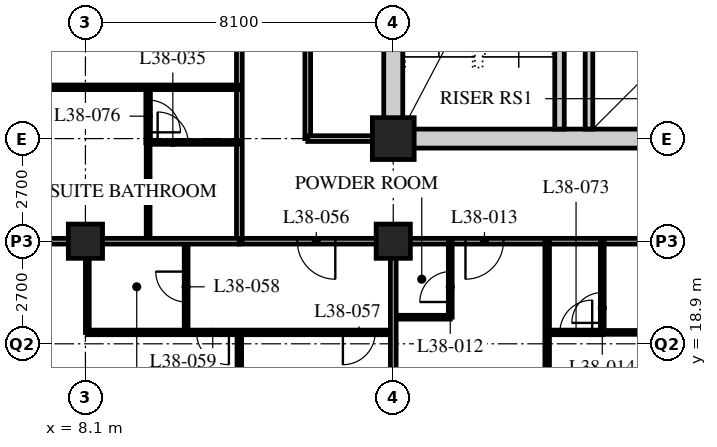
"""IFC4 building model, lengths in metres.
Left out: names, types, materials, properties, quantities, classifications, styles, units other than length and angle.
Written with IfcOpenShell. Run it as: python <this file> out.ifc"""

import sys

from ifc_helpers import new_model, si_unit, direction, frame, frame_2d, origin, origin_2d, place, context, subcontext, project, spatial, rectangle, hollow_rectangle, extrude, element, fill, save


model = new_model("IFC4")
c1 = context("Model", 3, precision=1e-05, world=origin(), true_north=direction((0.0, 1.0)))
c2 = subcontext(c1, "Body", "Model", "MODEL_VIEW")
j1 = project(units=[si_unit("LENGTHUNIT", "METRE"), si_unit("PLANEANGLEUNIT", "RADIAN")], contexts=[c1])
p1 = place(None, origin())
s1 = spatial("IfcSite", under=j1, at=p1, CompositionType="ELEMENT")
p2 = place(p1, origin())
s2 = spatial("IfcBuilding", under=s1, at=p2, CompositionType="ELEMENT")
p3 = place(p2, frame((0.0, 0.0, 147.6)))
s3 = spatial("IfcBuildingStorey", under=s2, at=p3, CompositionType="ELEMENT", Elevation=147.6)
for number, where, z_axis, x_axis in (
    (1, (8.1, 21.6, 0.0), (0.0, 0.0, 1.0), (1.0, 0.0, 0.0)),
    (2, (16.2, 21.6, 0.0), (0.0, 0.0, 1.0), (1.0, 0.0, 0.0)),
):
    element("IfcColumn", number, at=place(p3, frame(where, z_axis=z_axis, x_axis=x_axis)), inside=s3, PredefinedType="COLUMN", context=c2, shape_type="SweptSolid", body=[
        extrude(hollow_rectangle(XDim=0.9, YDim=0.9, WallThickness=0.1, at=origin_2d()), origin(), (0.0, 0.0, 1.0), 3.4),
    ])
p4 = place(p3, frame((16.2, 24.3, 0.0), z_axis=(0.0, 0.0, 1.0), x_axis=(1.0, 0.0, 0.0)))
e3 = element("IfcColumn", 3, at=p4, inside=s3, PredefinedType="COLUMN", context=c2, shape_type="SweptSolid", body=[
    extrude(hollow_rectangle(XDim=1.1, YDim=1.1, WallThickness=0.1, at=origin_2d()), origin(), (0.0, 0.0, 1.0), 3.4),
])
p5 = place(p3, frame((12.15, 21.6, 0.0), z_axis=(0.0, 0.0, 1.0), x_axis=(1.0, 0.0, 0.0)))
e4 = element("IfcWall", 4, at=p5, inside=s3, PredefinedType="PARTITIONING", context=c2, shape_type="SweptSolid", body=[
    extrude(rectangle(XDim=36.45, YDim=0.15, at=frame_2d((18.225, 0.0))), origin(), (0.0, 0.0, 1.0), 2.42),
])
p6 = place(p5, frame((5.95, 0.0, 0.0)))
e5 = element("IfcOpeningElement", 5, at=p6, cuts=e4, PredefinedType="OPENING", context=c2, shape_type="SweptSolid", body=[
    extrude(rectangle(XDim=1.0, YDim=2.1, at=frame_2d((0.5, 1.05))), frame((0.0, 0.085, 0.0), z_axis=(0.0, -1.0, 0.0), x_axis=(1.0, 0.0, 0.0)), (0.0, 0.0, 1.0), 0.17),
])
p7 = place(p5, frame((14.05, 0.0, 0.0)))
e6 = element("IfcOpeningElement", 6, at=p7, cuts=e4, PredefinedType="OPENING", context=c2, shape_type="SweptSolid", body=[
    extrude(rectangle(XDim=1.0, YDim=2.1, at=frame_2d((0.5, 1.05))), frame((0.0, 0.085, 0.0), z_axis=(0.0, -1.0, 0.0), x_axis=(1.0, 0.0, 0.0)), (0.0, 0.0, 1.0), 0.17),
])
p8 = place(p5, frame((22.15, 0.0, 0.0)))
e7 = element("IfcOpeningElement", 7, at=p8, cuts=e4, PredefinedType="OPENING", context=c2, shape_type="SweptSolid", body=[
    extrude(rectangle(XDim=1.0, YDim=2.1, at=frame_2d((0.5, 1.05))), frame((0.0, 0.085, 0.0), z_axis=(0.0, -1.0, 0.0), x_axis=(1.0, 0.0, 0.0)), (0.0, 0.0, 1.0), 0.17),
])
p9 = place(p5, frame((30.8, 0.0, 0.0)))
e8 = element("IfcOpeningElement", 8, at=p9, cuts=e4, PredefinedType="OPENING", context=c2, shape_type="SweptSolid", body=[
    extrude(rectangle(XDim=1.0, YDim=2.1, at=frame_2d((0.5, 1.05))), frame((0.0, 0.085, 0.0), z_axis=(0.0, -1.0, 0.0), x_axis=(1.0, 0.0, 0.0)), (0.0, 0.0, 1.0), 0.17),
])
p10 = place(p5, frame((1.525, 0.0, 0.0)))
e9 = element("IfcOpeningElement", 9, at=p10, cuts=e4, PredefinedType="OPENING", context=c2, shape_type="SweptSolid", body=[
    extrude(rectangle(XDim=1.0, YDim=2.1, at=frame_2d((0.5, 1.05))), frame((0.0, 0.085, 0.0), z_axis=(0.0, -1.0, 0.0), x_axis=(1.0, 0.0, 0.0)), (0.0, 0.0, 1.0), 0.17),
])
p11 = place(p5, frame((33.925, 0.0, 0.0)))
e10 = element("IfcOpeningElement", 10, at=p11, cuts=e4, PredefinedType="OPENING", context=c2, shape_type="SweptSolid", body=[
    extrude(rectangle(XDim=1.0, YDim=2.1, at=frame_2d((0.5, 1.05))), frame((0.0, 0.085, 0.0), z_axis=(0.0, -1.0, 0.0), x_axis=(1.0, 0.0, 0.0)), (0.0, 0.0, 1.0), 0.17),
])
p12 = place(p3, frame((12.15, 21.6, 0.0), z_axis=(0.0, 0.0, 1.0), x_axis=(0.0, 1.0, 0.0)))
e11 = element("IfcWall", 11, at=p12, inside=s3, PredefinedType="PARTITIONING", context=c2, shape_type="SweptSolid", body=[
    extrude(rectangle(XDim=24.3, YDim=0.15, at=frame_2d((12.15, 0.0))), origin(), (0.0, 0.0, 1.0), 3.19),
])
p13 = place(p12, frame((5.575, 0.0, 0.0)))
e12 = element("IfcOpeningElement", 12, at=p13, cuts=e11, PredefinedType="OPENING", context=c2, shape_type="SweptSolid", body=[
    extrude(rectangle(XDim=1.0, YDim=2.1, at=frame_2d((0.5, 1.05))), frame((0.0, 0.085, 0.0), z_axis=(0.0, -1.0, 0.0), x_axis=(1.0, 0.0, 0.0)), (0.0, 0.0, 1.0), 0.17),
])
p14 = place(p12, frame((14.05, 0.0, 0.0)))
e13 = element("IfcOpeningElement", 13, at=p14, cuts=e11, PredefinedType="OPENING", context=c2, shape_type="SweptSolid", body=[
    extrude(rectangle(XDim=1.0, YDim=2.1, at=frame_2d((0.5, 1.05))), frame((0.0, 0.085, 0.0), z_axis=(0.0, -1.0, 0.0), x_axis=(1.0, 0.0, 0.0)), (0.0, 0.0, 1.0), 0.17),
])
p15 = place(p12, frame((22.7, 0.0, 0.0)))
e14 = element("IfcOpeningElement", 14, at=p15, cuts=e11, PredefinedType="OPENING", context=c2, shape_type="SweptSolid", body=[
    extrude(rectangle(XDim=1.0, YDim=2.1, at=frame_2d((0.5, 1.05))), frame((0.0, 0.085, 0.0), z_axis=(0.0, -1.0, 0.0), x_axis=(1.0, 0.0, 0.0)), (0.0, 0.0, 1.0), 0.17),
])
p16 = place(p3, frame((13.95, 44.1, 0.0), z_axis=(0.0, 0.0, 1.0), x_axis=(0.0, -1.0, 0.0)))
e15 = element("IfcWall", 15, at=p16, inside=s3, PredefinedType="PARTITIONING", context=c2, shape_type="SweptSolid", body=[
    extrude(rectangle(XDim=19.8, YDim=0.15, at=frame_2d((9.9, 0.0))), origin(), (0.0, 0.0, 1.0), 3.19),
])
p17 = place(p16, frame((15.25, 0.0, 0.0)))
e16 = element("IfcOpeningElement", 16, at=p17, cuts=e15, PredefinedType="OPENING", context=c2, shape_type="SweptSolid", body=[
    extrude(rectangle(XDim=1.0, YDim=2.1, at=frame_2d((0.5, 1.05))), frame((0.0, 0.085, 0.0), z_axis=(0.0, -1.0, 0.0), x_axis=(1.0, 0.0, 0.0)), (0.0, 0.0, 1.0), 0.17),
])
p18 = place(p16, frame((7.15, 0.0, 0.0)))
e17 = element("IfcOpeningElement", 17, at=p18, cuts=e15, PredefinedType="OPENING", context=c2, shape_type="SweptSolid", body=[
    extrude(rectangle(XDim=1.0, YDim=2.1, at=frame_2d((0.5, 1.05))), frame((0.0, 0.085, 0.0), z_axis=(0.0, -1.0, 0.0), x_axis=(1.0, 0.0, 0.0)), (0.0, 0.0, 1.0), 0.17),
])
p19 = place(p3, frame((13.95, 24.3, 0.0), z_axis=(0.0, 0.0, 1.0), x_axis=(1.0, 0.0, 0.0)))
e18 = element("IfcWall", 18, at=p19, inside=s3, PredefinedType="PARTITIONING", context=c2, shape_type="SweptSolid", body=[
    extrude(rectangle(XDim=2.05, YDim=0.15, at=frame_2d((1.025, 0.0))), origin(), (0.0, 0.0, 1.0), 3.19),
])
p20 = place(p3, frame((16.2, 19.6, 0.0), z_axis=(0.0, 0.0, 1.0), x_axis=(1.0, 0.0, 0.0)))
e19 = element("IfcWall", 19, at=p20, inside=s3, PredefinedType="PARTITIONING", context=c2, shape_type="SweptSolid", body=[
    extrude(rectangle(XDim=1.5, YDim=0.1, at=frame_2d((0.75, 0.0))), origin(), (0.0, 0.0, 1.0), 3.19),
])
p21 = place(p3, frame((17.7, 21.6, 0.0), z_axis=(0.0, 0.0, 1.0), x_axis=(0.0, -1.0, 0.0)))
e20 = element("IfcWall", 20, at=p21, inside=s3, PredefinedType="PARTITIONING", context=c2, shape_type="SweptSolid", body=[
    extrude(rectangle(XDim=2.0, YDim=0.1, at=frame_2d((1.0, 0.0))), origin(), (0.0, 0.0, 1.0), 3.19),
])
p22 = place(p21, frame((0.8, 0.0, 0.0)))
e21 = element("IfcOpeningElement", 21, at=p22, cuts=e20, PredefinedType="OPENING", context=c2, shape_type="SweptSolid", body=[
    extrude(rectangle(XDim=0.8, YDim=2.1, at=frame_2d((0.4, 1.05))), frame((0.0, 0.06, 0.0), z_axis=(0.0, -1.0, 0.0), x_axis=(1.0, 0.0, 0.0)), (0.0, 0.0, 1.0), 0.12),
])
p23 = place(p3, frame((21.7, 19.2, 0.0), z_axis=(0.0, 0.0, 1.0), x_axis=(1.0, 0.0, 0.0)))
e22 = element("IfcWall", 22, at=p23, inside=s3, PredefinedType="PARTITIONING", context=c2, shape_type="SweptSolid", body=[
    extrude(rectangle(XDim=2.6, YDim=0.1, at=frame_2d((1.3, 0.0))), origin(), (0.0, 0.0, 1.0), 3.19),
])
p24 = place(p3, frame((21.7, 21.6, 0.0), z_axis=(0.0, 0.0, 1.0), x_axis=(0.0, -1.0, 0.0)))
e23 = element("IfcWall", 23, at=p24, inside=s3, PredefinedType="PARTITIONING", context=c2, shape_type="SweptSolid", body=[
    extrude(rectangle(XDim=2.4, YDim=0.1, at=frame_2d((1.2, 0.0))), origin(), (0.0, 0.0, 1.0), 3.19),
])
p25 = place(p24, frame((1.35, 0.0, 0.0)))
e24 = element("IfcOpeningElement", 24, at=p25, cuts=e23, PredefinedType="OPENING", context=c2, shape_type="SweptSolid", body=[
    extrude(rectangle(XDim=0.8, YDim=2.1, at=frame_2d((0.4, 1.05))), frame((0.0, 0.06, 0.0), z_axis=(0.0, -1.0, 0.0), x_axis=(1.0, 0.0, 0.0)), (0.0, 0.0, 1.0), 0.12),
])
p26 = place(p3, frame((20.25, 21.6, 0.0), z_axis=(0.0, 0.0, 1.0), x_axis=(0.0, -1.0, 0.0)))
e25 = element("IfcWall", 25, at=p26, inside=s3, PredefinedType="PARTITIONING", context=c2, shape_type="SweptSolid", body=[
    extrude(rectangle(XDim=15.9, YDim=0.12, at=frame_2d((7.95, 0.0))), origin(), (0.0, 0.0, 1.0), 3.19),
])
p27 = place(p26, frame((8.875, 0.0, 0.0)))
e26 = element("IfcOpeningElement", 26, at=p27, cuts=e25, PredefinedType="OPENING", context=c2, shape_type="SweptSolid", body=[
    extrude(rectangle(XDim=0.85, YDim=2.1, at=frame_2d((0.425, 1.05))), frame((0.0, 0.07, 0.0), z_axis=(0.0, -1.0, 0.0), x_axis=(1.0, 0.0, 0.0)), (0.0, 0.0, 1.0), 0.14),
])
p28 = place(p3, frame((9.75, 21.6, 0.0), z_axis=(0.0, 0.0, 1.0), x_axis=(0.0, 1.0, 0.0)))
e27 = element("IfcWall", 27, at=p28, inside=s3, PredefinedType="PARTITIONING", context=c2, shape_type="SweptSolid", body=[
    extrude(rectangle(XDim=2.6, YDim=0.1, at=frame_2d((1.3, 0.0))), origin(), (0.0, 0.0, 1.0), 3.19),
])
p29 = place(p3, frame((12.15, 24.2, 0.0), z_axis=(0.0, 0.0, 1.0), x_axis=(-1.0, 0.0, 0.0)))
e28 = element("IfcWall", 28, at=p29, inside=s3, PredefinedType="PARTITIONING", context=c2, shape_type="SweptSolid", body=[
    extrude(rectangle(XDim=2.4, YDim=0.1, at=frame_2d((1.2, 0.0))), origin(), (0.0, 0.0, 1.0), 3.19),
])
p30 = place(p29, frame((1.35, 0.0, 0.0)))
e29 = element("IfcOpeningElement", 29, at=p30, cuts=e28, PredefinedType="OPENING", context=c2, shape_type="SweptSolid", body=[
    extrude(rectangle(XDim=0.8, YDim=2.1, at=frame_2d((0.4, 1.05))), frame((0.0, 0.06, 0.0), z_axis=(0.0, -1.0, 0.0), x_axis=(1.0, 0.0, 0.0)), (0.0, 0.0, 1.0), 0.12),
])
p31 = place(p3, frame((12.15, 25.65, 0.0), z_axis=(0.0, 0.0, 1.0), x_axis=(-1.0, 0.0, 0.0)))
e30 = element("IfcWall", 30, at=p31, inside=s3, PredefinedType="PARTITIONING", context=c2, shape_type="SweptSolid", body=[
    extrude(rectangle(XDim=11.85, YDim=0.12, at=frame_2d((5.925, 0.0))), origin(), (0.0, 0.0, 1.0), 3.19),
])
p32 = place(p31, frame((6.85, 0.0, 0.0)))
e31 = element("IfcOpeningElement", 31, at=p32, cuts=e30, PredefinedType="OPENING", context=c2, shape_type="SweptSolid", body=[
    extrude(rectangle(XDim=0.85, YDim=2.1, at=frame_2d((0.425, 1.05))), frame((0.0, 0.07, 0.0), z_axis=(0.0, -1.0, 0.0), x_axis=(1.0, 0.0, 0.0)), (0.0, 0.0, 1.0), 0.14),
])
p33 = place(p3, frame((10.75, 21.6, 0.0), z_axis=(0.0, 0.0, 1.0), x_axis=(0.0, -1.0, 0.0)))
e32 = element("IfcWall", 32, at=p33, inside=s3, PredefinedType="PARTITIONING", context=c2, shape_type="SweptSolid", body=[
    extrude(rectangle(XDim=2.4, YDim=0.1, at=frame_2d((1.2, 0.0))), origin(), (0.0, 0.0, 1.0), 3.19),
])
p34 = place(p33, frame((0.8, 0.0, 0.0)))
e33 = element("IfcOpeningElement", 33, at=p34, cuts=e32, PredefinedType="OPENING", context=c2, shape_type="SweptSolid", body=[
    extrude(rectangle(XDim=0.8, YDim=2.1, at=frame_2d((0.4, 1.05))), frame((0.0, 0.06, 0.0), z_axis=(0.0, -1.0, 0.0), x_axis=(1.0, 0.0, 0.0)), (0.0, 0.0, 1.0), 0.12),
])
p35 = place(p3, frame((8.15, 21.6, 0.0), z_axis=(0.0, 0.0, 1.0), x_axis=(0.0, -1.0, 0.0)))
e34 = element("IfcWall", 34, at=p35, inside=s3, PredefinedType="PARTITIONING", context=c2, shape_type="SweptSolid", body=[
    extrude(rectangle(XDim=2.4, YDim=0.1, at=frame_2d((1.2, 0.0))), origin(), (0.0, 0.0, 1.0), 2.42),
])
p36 = place(p3, frame((8.15, 19.2, 0.0), z_axis=(0.0, 0.0, 1.0), x_axis=(1.0, 0.0, 0.0)))
e35 = element("IfcWall", 35, at=p36, inside=s3, PredefinedType="PARTITIONING", context=c2, shape_type="SweptSolid", body=[
    extrude(rectangle(XDim=8.05, YDim=0.12, at=frame_2d((4.025, 0.0))), origin(), (0.0, 0.0, 1.0), 3.19),
])
p37 = place(p36, frame((6.725, 0.0, 0.0)))
e36 = element("IfcOpeningElement", 36, at=p37, cuts=e35, PredefinedType="OPENING", context=c2, shape_type="SweptSolid", body=[
    extrude(rectangle(XDim=0.85, YDim=2.1, at=frame_2d((0.425, 1.05))), frame((0.0, 0.07, 0.0), z_axis=(0.0, -1.0, 0.0), x_axis=(1.0, 0.0, 0.0)), (0.0, 0.0, 1.0), 0.14),
])
p38 = place(p36, frame((2.875, 0.0, 0.0)))
e37 = element("IfcOpeningElement", 37, at=p38, cuts=e35, PredefinedType="OPENING", context=c2, shape_type="SweptSolid", body=[
    extrude(rectangle(XDim=0.85, YDim=2.1, at=frame_2d((0.425, 1.05))), frame((0.0, 0.07, 0.0), z_axis=(0.0, -1.0, 0.0), x_axis=(1.0, 0.0, 0.0)), (0.0, 0.0, 1.0), 0.14),
])
p39 = place(p3, frame((12.15, 19.2, 0.0), z_axis=(0.0, 0.0, 1.0), x_axis=(0.0, -1.0, 0.0)))
e38 = element("IfcWall", 38, at=p39, inside=s3, PredefinedType="PARTITIONING", context=c2, shape_type="SweptSolid", body=[
    extrude(rectangle(XDim=13.5, YDim=0.12, at=frame_2d((6.75, 0.0))), origin(), (0.0, 0.0, 1.0), 3.19),
])
p40 = place(p3, frame((0.3, 21.6, 0.0), z_axis=(0.0, 0.0, 1.0), x_axis=(1.0, 0.0, 0.0)))
e39 = element("IfcWall", 39, at=p40, inside=s3, PredefinedType="PARTITIONING", context=c2, shape_type="SweptSolid", body=[
    extrude(rectangle(XDim=11.85, YDim=0.15, at=frame_2d((5.925, 0.0))), origin(), (0.0, 0.0, 1.0), 2.42),
])
p41 = place(p3, frame((16.2, 21.6, 0.0), z_axis=(0.0, 0.0, 1.0), x_axis=(0.0, -1.0, 0.0)))
e40 = element("IfcWall", 40, at=p41, inside=s3, PredefinedType="PARTITIONING", context=c2, shape_type="SweptSolid", body=[
    extrude(rectangle(XDim=15.9, YDim=0.15, at=frame_2d((7.95, 0.0))), origin(), (0.0, 0.0, 1.0), 2.42),
])
p42 = place(p3, frame((21.71, 19.2, 0.0), z_axis=(0.0, 0.0, 1.0), x_axis=(-1.0, 0.0, 0.0)))
e41 = element("IfcWall", 41, at=p42, inside=s3, PredefinedType="PARTITIONING", context=c2, shape_type="SweptSolid", body=[
    extrude(rectangle(XDim=1.46, YDim=0.12, at=frame_2d((0.73, 0.0))), origin(), (0.0, 0.0, 1.0), 3.19),
])
p43 = place(p42, frame((0.275, 0.0, 0.0)))
e42 = element("IfcOpeningElement", 42, at=p43, cuts=e41, PredefinedType="OPENING", context=c2, shape_type="SweptSolid", body=[
    extrude(rectangle(XDim=0.85, YDim=2.1, at=frame_2d((0.425, 1.05))), frame((0.0, 0.07, 0.0), z_axis=(0.0, -1.0, 0.0), x_axis=(1.0, 0.0, 0.0)), (0.0, 0.0, 1.0), 0.14),
])
p44 = place(p3, frame((9.75, 24.19, 0.0), z_axis=(0.0, 0.0, 1.0), x_axis=(0.0, 1.0, 0.0)))
e43 = element("IfcWall", 43, at=p44, inside=s3, PredefinedType="PARTITIONING", context=c2, shape_type="SweptSolid", body=[
    extrude(rectangle(XDim=1.46, YDim=0.12, at=frame_2d((0.73, 0.0))), origin(), (0.0, 0.0, 1.0), 3.19),
])
p45 = place(p44, frame((0.275, 0.0, 0.0)))
e44 = element("IfcOpeningElement", 44, at=p45, cuts=e43, PredefinedType="OPENING", context=c2, shape_type="SweptSolid", body=[
    extrude(rectangle(XDim=0.85, YDim=2.1, at=frame_2d((0.425, 1.05))), frame((0.0, 0.07, 0.0), z_axis=(0.0, -1.0, 0.0), x_axis=(1.0, 0.0, 0.0)), (0.0, 0.0, 1.0), 0.14),
])
p46 = place(p3, frame((15.95, 24.3, 0.0), z_axis=(0.0, 0.0, 1.0), x_axis=(1.0, 0.0, 0.0)))
e45 = element("IfcWall", 45, at=p46, inside=s3, PredefinedType="SOLIDWALL", context=c2, shape_type="SweptSolid", body=[
    extrude(rectangle(XDim=24.8, YDim=0.5, at=frame_2d((12.4, 0.0))), origin(), (0.0, 0.0, 1.0), 2.42),
])
p47 = place(p46, frame((11.5, 0.0, 0.0)))
e46 = element("IfcOpeningElement", 46, at=p47, cuts=e45, PredefinedType="OPENING", context=c2, shape_type="SweptSolid", body=[
    extrude(rectangle(XDim=1.8, YDim=2.4, at=frame_2d((0.9, 1.2))), frame((0.0, 0.26, 0.0), z_axis=(0.0, -1.0, 0.0), x_axis=(1.0, 0.0, 0.0)), (0.0, 0.0, 1.0), 0.52),
])
p48 = place(p3, frame((16.2, 24.55, 0.0), z_axis=(0.0, 0.0, 1.0), x_axis=(0.0, 1.0, 0.0)))
e47 = element("IfcWall", 47, at=p48, inside=s3, PredefinedType="SOLIDWALL", context=c2, shape_type="SweptSolid", body=[
    extrude(rectangle(XDim=15.7, YDim=0.5, at=frame_2d((7.85, 0.0))), origin(), (0.0, 0.0, 1.0), 2.42),
])
p49 = place(p3, frame((20.575, 24.55, 0.0), z_axis=(0.0, 0.0, 1.0), x_axis=(0.0, 1.0, 0.0)))
e48 = element("IfcWall", 48, at=p49, inside=s3, PredefinedType="SOLIDWALL", context=c2, shape_type="SweptSolid", body=[
    extrude(rectangle(XDim=7.75, YDim=0.25, at=frame_2d((3.875, 0.0))), origin(), (0.0, 0.0, 1.0), 3.19),
])
p50 = place(p49, frame((6.2, 0.0, 0.0)))
e49 = element("IfcOpeningElement", 49, at=p50, cuts=e48, PredefinedType="OPENING", context=c2, shape_type="SweptSolid", body=[
    extrude(rectangle(XDim=1.2, YDim=2.1, at=frame_2d((0.6, 1.05))), frame((0.0, 0.135, 0.0), z_axis=(0.0, -1.0, 0.0), x_axis=(1.0, 0.0, 0.0)), (0.0, 0.0, 1.0), 0.27),
])
p51 = place(p3, frame((21.35, 24.55, 0.0), z_axis=(0.0, 0.0, 1.0), x_axis=(0.0, 1.0, 0.0)))
e50 = element("IfcWall", 50, at=p51, inside=s3, PredefinedType="SOLIDWALL", context=c2, shape_type="SweptSolid", body=[
    extrude(rectangle(XDim=2.6, YDim=0.2, at=frame_2d((1.3, 0.0))), origin(), (0.0, 0.0, 1.0), 3.19),
])
p52 = place(p22, origin())
e51 = element("IfcDoor", 51, at=p52, inside=s3, OperationType="SINGLE_SWING_LEFT", PredefinedType="DOOR", context=c2, shape_type="SweptSolid", body=[
    extrude(rectangle(XDim=0.8, YDim=2.1, at=frame_2d((0.4, 1.05))), frame((0.0, 0.025, 0.0), z_axis=(0.0, -1.0, 0.0), x_axis=(1.0, 0.0, 0.0)), (0.0, 0.0, 1.0), 0.05),
])
fill(e21, e51)
p53 = place(p6, origin())
e52 = element("IfcDoor", 52, at=p53, inside=s3, OperationType="SINGLE_SWING_RIGHT", PredefinedType="DOOR", context=c2, shape_type="SweptSolid", body=[
    extrude(rectangle(XDim=1.0, YDim=2.1, at=frame_2d((0.5, 1.05))), frame((0.0, 0.025, 0.0), z_axis=(0.0, -1.0, 0.0), x_axis=(1.0, 0.0, 0.0)), (0.0, 0.0, 1.0), 0.05),
])
fill(e5, e52)
p54 = place(p25, origin())
e53 = element("IfcDoor", 53, at=p54, inside=s3, OperationType="SINGLE_SWING_LEFT", PredefinedType="DOOR", context=c2, shape_type="SweptSolid", body=[
    extrude(rectangle(XDim=0.8, YDim=2.1, at=frame_2d((0.4, 1.05))), frame((0.0, 0.025, 0.0), z_axis=(0.0, -1.0, 0.0), x_axis=(1.0, 0.0, 0.0)), (0.0, 0.0, 1.0), 0.05),
])
fill(e24, e53)
p55 = place(p30, origin())
e54 = element("IfcDoor", 54, at=p55, inside=s3, OperationType="SINGLE_SWING_LEFT", PredefinedType="DOOR", context=c2, shape_type="SweptSolid", body=[
    extrude(rectangle(XDim=0.8, YDim=2.1, at=frame_2d((0.4, 1.05))), frame((0.0, 0.025, 0.0), z_axis=(0.0, -1.0, 0.0), x_axis=(1.0, 0.0, 0.0)), (0.0, 0.0, 1.0), 0.05),
])
fill(e29, e54)
p56 = place(p10, origin())
e55 = element("IfcDoor", 55, at=p56, inside=s3, OperationType="SINGLE_SWING_LEFT", PredefinedType="DOOR", context=c2, shape_type="SweptSolid", body=[
    extrude(rectangle(XDim=1.0, YDim=2.1, at=frame_2d((0.5, 1.05))), frame((0.0, 0.025, 0.0), z_axis=(0.0, -1.0, 0.0), x_axis=(1.0, 0.0, 0.0)), (0.0, 0.0, 1.0), 0.05),
])
fill(e9, e55)
p57 = place(p37, origin())
e56 = element("IfcDoor", 56, at=p57, inside=s3, OperationType="SINGLE_SWING_RIGHT", PredefinedType="DOOR", context=c2, shape_type="SweptSolid", body=[
    extrude(rectangle(XDim=0.85, YDim=2.1, at=frame_2d((0.425, 1.05))), frame((0.0, 0.025, 0.0), z_axis=(0.0, -1.0, 0.0), x_axis=(1.0, 0.0, 0.0)), (0.0, 0.0, 1.0), 0.05),
])
fill(e36, e56)
p58 = place(p34, origin())
e57 = element("IfcDoor", 57, at=p58, inside=s3, OperationType="SINGLE_SWING_RIGHT", PredefinedType="DOOR", context=c2, shape_type="SweptSolid", body=[
    extrude(rectangle(XDim=0.8, YDim=2.1, at=frame_2d((0.4, 1.05))), frame((0.0, 0.025, 0.0), z_axis=(0.0, -1.0, 0.0), x_axis=(1.0, 0.0, 0.0)), (0.0, 0.0, 1.0), 0.05),
])
fill(e33, e57)
p59 = place(p38, origin())
e58 = element("IfcDoor", 58, at=p59, inside=s3, OperationType="SINGLE_SWING_LEFT", PredefinedType="DOOR", context=c2, shape_type="SweptSolid", body=[
    extrude(rectangle(XDim=0.85, YDim=2.1, at=frame_2d((0.425, 1.05))), frame((0.0, 0.025, 0.0), z_axis=(0.0, -1.0, 0.0), x_axis=(1.0, 0.0, 0.0)), (0.0, 0.0, 1.0), 0.05),
])
fill(e37, e58)
p60 = place(p43, origin())
e59 = element("IfcDoor", 59, at=p60, inside=s3, OperationType="SINGLE_SWING_RIGHT", PredefinedType="DOOR", context=c2, shape_type="SweptSolid", body=[
    extrude(rectangle(XDim=0.85, YDim=2.1, at=frame_2d((0.425, 1.05))), frame((0.0, 0.025, 0.0), z_axis=(0.0, -1.0, 0.0), x_axis=(1.0, 0.0, 0.0)), (0.0, 0.0, 1.0), 0.05),
])
fill(e42, e59)
p61 = place(p45, origin())
e60 = element("IfcDoor", 60, at=p61, inside=s3, OperationType="SINGLE_SWING_RIGHT", PredefinedType="DOOR", context=c2, shape_type="SweptSolid", body=[
    extrude(rectangle(XDim=0.85, YDim=2.1, at=frame_2d((0.425, 1.05))), frame((0.0, 0.025, 0.0), z_axis=(0.0, -1.0, 0.0), x_axis=(1.0, 0.0, 0.0)), (0.0, 0.0, 1.0), 0.05),
])
fill(e44, e60)
save(model, sys.argv[1])
